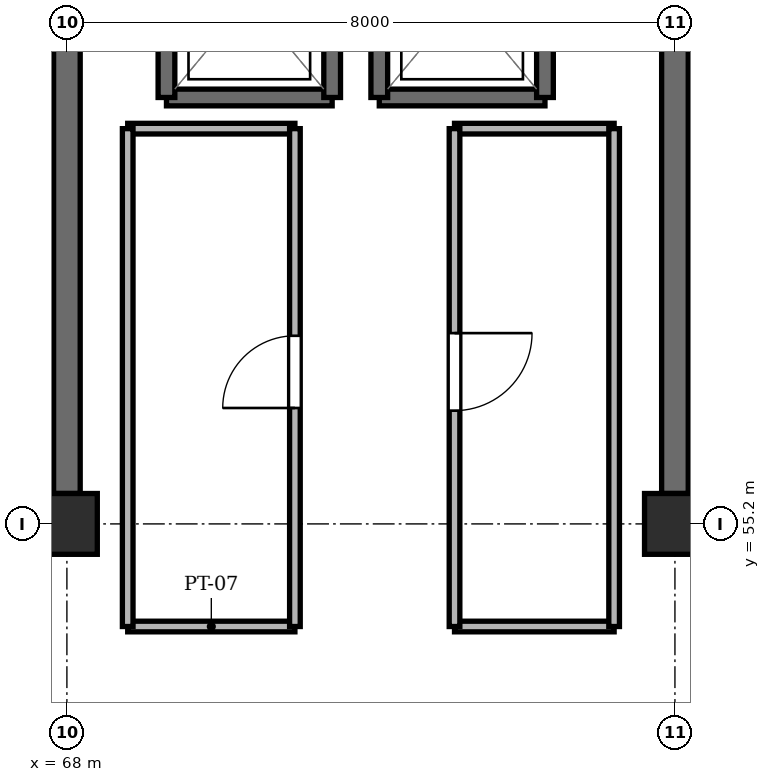
"""IFC4 building model, lengths in metres.
Left out: names, types, materials, properties, quantities, classifications, styles, units other than length and angle.
Written with IfcOpenShell. Run it as: python <this file> out.ifc"""

import sys

from ifc_helpers import new_model, si_unit, direction, frame, frame_2d, origin, origin_2d, place, context, subcontext, project, spatial, rectangle, extrude, element, fill, save


model = new_model("IFC4")
c1 = context("Model", 3, precision=1e-05, world=origin(), true_north=direction((0.0, 1.0)))
c2 = subcontext(c1, "Body", "Model", "MODEL_VIEW")
j1 = project(units=[si_unit("LENGTHUNIT", "METRE"), si_unit("PLANEANGLEUNIT", "RADIAN")], contexts=[c1])
p1 = place(None, origin())
s1 = spatial("IfcSite", under=j1, at=p1, CompositionType="ELEMENT")
p2 = place(p1, origin())
s2 = spatial("IfcBuilding", under=s1, at=p2, CompositionType="ELEMENT")
p3 = place(p2, frame((0.0, 0.0, 56.8)))
s3 = spatial("IfcBuildingStorey", under=s2, at=p3, CompositionType="ELEMENT", Elevation=56.8)
for number, where, z_axis, x_axis in (
    (1, (68.0, 55.2, -0.22), (0.0, 0.0, 1.0), (1.0, 0.0, 0.0)),
    (2, (76.0, 55.2, -0.22), (0.0, 0.0, 1.0), (1.0, 0.0, 0.0)),
):
    element("IfcColumn", number, at=place(p3, frame(where, z_axis=z_axis, x_axis=x_axis)), inside=s3, PredefinedType="COLUMN", context=c2, shape_type="SweptSolid", body=[
        extrude(rectangle(XDim=0.8, YDim=0.8, at=origin_2d()), origin(), (0.0, 0.0, 1.0), 3.26),
    ])
for number, where, z_axis, x_axis in (
    (3, (68.0, 55.6, 0.0), (0.0, 0.0, 1.0), (0.0, 1.0, 0.0)),
    (4, (76.0, 55.6, 0.0), (0.0, 0.0, 1.0), (0.0, 1.0, 0.0)),
):
    element("IfcWall", number, at=place(p3, frame(where, z_axis=z_axis, x_axis=x_axis)), inside=s3, PredefinedType="SHEAR", context=c2, shape_type="SweptSolid", body=[
        extrude(rectangle(XDim=6.45, YDim=0.35, at=frame_2d((3.225, 0.0))), origin(), (0.0, 0.0, 1.0), 3.04),
    ])
p4 = place(p3, frame((69.31, 60.81, 0.0), z_axis=(0.0, 0.0, 1.0), x_axis=(1.0, 0.0, 0.0)))
e5 = element("IfcWall", 5, at=p4, inside=s3, PredefinedType="SHEAR", context=c2, shape_type="SweptSolid", body=[
    extrude(rectangle(XDim=2.18, YDim=0.22, at=frame_2d((1.09, 0.0))), origin(), (0.0, 0.0, 1.0), 3.04),
])
for number, where, z_axis, x_axis in (
    (6, (69.31, 63.39, 0.0), (0.0, 0.0, 1.0), (0.0, -1.0, 0.0)),
    (7, (71.49, 60.81, 0.0), (0.0, 0.0, 1.0), (0.0, 1.0, 0.0)),
):
    element("IfcWall", number, at=place(p3, frame(where, z_axis=z_axis, x_axis=x_axis)), inside=s3, PredefinedType="SHEAR", context=c2, shape_type="SweptSolid", body=[
        extrude(rectangle(XDim=2.58, YDim=0.22, at=frame_2d((1.29, 0.0))), origin(), (0.0, 0.0, 1.0), 3.04),
    ])
p5 = place(p3, frame((72.11, 60.81, 0.0), z_axis=(0.0, 0.0, 1.0), x_axis=(1.0, 0.0, 0.0)))
e8 = element("IfcWall", 8, at=p5, inside=s3, PredefinedType="SHEAR", context=c2, shape_type="SweptSolid", body=[
    extrude(rectangle(XDim=2.18, YDim=0.22, at=frame_2d((1.09, 0.0))), origin(), (0.0, 0.0, 1.0), 3.04),
])
for number, where, z_axis, x_axis in (
    (9, (72.11, 63.39, 0.0), (0.0, 0.0, 1.0), (0.0, -1.0, 0.0)),
    (10, (74.29, 60.81, 0.0), (0.0, 0.0, 1.0), (0.0, 1.0, 0.0)),
):
    element("IfcWall", number, at=place(p3, frame(where, z_axis=z_axis, x_axis=x_axis)), inside=s3, PredefinedType="SHEAR", context=c2, shape_type="SweptSolid", body=[
        extrude(rectangle(XDim=2.58, YDim=0.22, at=frame_2d((1.29, 0.0))), origin(), (0.0, 0.0, 1.0), 3.04),
    ])
for number, where, z_axis, x_axis in (
    (11, (68.8, 53.85, 0.0), (0.0, 0.0, 1.0), (1.0, 0.0, 0.0)),
    (12, (68.8, 60.4, 0.0), (0.0, 0.0, 1.0), (1.0, 0.0, 0.0)),
):
    element("IfcWall", number, at=place(p3, frame(where, z_axis=z_axis, x_axis=x_axis)), inside=s3, PredefinedType="PARTITIONING", context=c2, shape_type="SweptSolid", body=[
        extrude(rectangle(XDim=2.2, YDim=0.14, at=frame_2d((1.1, 0.0))), origin(), (0.0, 0.0, 1.0), 2.53),
    ])
p6 = place(p3, frame((68.8, 53.85, 0.0), z_axis=(0.0, 0.0, 1.0), x_axis=(0.0, 1.0, 0.0)))
e13 = element("IfcWall", 13, at=p6, inside=s3, PredefinedType="PARTITIONING", context=c2, shape_type="SweptSolid", body=[
    extrude(rectangle(XDim=6.55, YDim=0.14, at=frame_2d((3.275, 0.0))), origin(), (0.0, 0.0, 1.0), 2.53),
])
p7 = place(p3, frame((71.0, 53.85, 0.0), z_axis=(0.0, 0.0, 1.0), x_axis=(0.0, 1.0, 0.0)))
e14 = element("IfcWall", 14, at=p7, inside=s3, PredefinedType="PARTITIONING", context=c2, shape_type="SweptSolid", body=[
    extrude(rectangle(XDim=6.55, YDim=0.14, at=frame_2d((3.275, 0.0))), origin(), (0.0, 0.0, 1.0), 2.53),
])
p8 = place(p7, frame((2.875, 0.0, 0.0)))
e15 = element("IfcOpeningElement", 15, at=p8, cuts=e14, PredefinedType="OPENING", context=c2, shape_type="SweptSolid", body=[
    extrude(rectangle(XDim=0.95, YDim=2.1, at=frame_2d((0.475, 1.05))), frame((0.0, 0.082, 0.0), z_axis=(0.0, -1.0, 0.0), x_axis=(1.0, 0.0, 0.0)), (0.0, 0.0, 1.0), 0.164),
])
for number, where, z_axis, x_axis in (
    (16, (73.1, 53.85, 0.0), (0.0, 0.0, 1.0), (1.0, 0.0, 0.0)),
    (17, (73.1, 60.4, 0.0), (0.0, 0.0, 1.0), (1.0, 0.0, 0.0)),
):
    element("IfcWall", number, at=place(p3, frame(where, z_axis=z_axis, x_axis=x_axis)), inside=s3, PredefinedType="PARTITIONING", context=c2, shape_type="SweptSolid", body=[
        extrude(rectangle(XDim=2.1, YDim=0.14, at=frame_2d((1.05, 0.0))), origin(), (0.0, 0.0, 1.0), 2.53),
    ])
p9 = place(p3, frame((73.1, 53.85, 0.0), z_axis=(0.0, 0.0, 1.0), x_axis=(0.0, 1.0, 0.0)))
e18 = element("IfcWall", 18, at=p9, inside=s3, PredefinedType="PARTITIONING", context=c2, shape_type="SweptSolid", body=[
    extrude(rectangle(XDim=6.55, YDim=0.14, at=frame_2d((3.275, 0.0))), origin(), (0.0, 0.0, 1.0), 2.53),
])
p10 = place(p9, frame((2.84, 0.0, 0.0)))
e19 = element("IfcOpeningElement", 19, at=p10, cuts=e18, PredefinedType="OPENING", context=c2, shape_type="SweptSolid", body=[
    extrude(rectangle(XDim=1.02, YDim=2.1, at=frame_2d((0.51, 1.05))), frame((0.0, 0.082, 0.0), z_axis=(0.0, -1.0, 0.0), x_axis=(1.0, 0.0, 0.0)), (0.0, 0.0, 1.0), 0.164),
])
p11 = place(p3, frame((75.2, 53.85, 0.0), z_axis=(0.0, 0.0, 1.0), x_axis=(0.0, 1.0, 0.0)))
e20 = element("IfcWall", 20, at=p11, inside=s3, PredefinedType="PARTITIONING", context=c2, shape_type="SweptSolid", body=[
    extrude(rectangle(XDim=6.55, YDim=0.14, at=frame_2d((3.275, 0.0))), origin(), (0.0, 0.0, 1.0), 2.53),
])
p12 = place(p8, origin())
e21 = element("IfcDoor", 21, at=p12, inside=s3, OperationType="SINGLE_SWING_LEFT", PredefinedType="DOOR", context=c2, shape_type="SweptSolid", body=[
    extrude(rectangle(XDim=0.95, YDim=2.1, at=frame_2d((0.475, 1.05))), frame((0.0, 0.025, 0.0), z_axis=(0.0, -1.0, 0.0), x_axis=(1.0, 0.0, 0.0)), (0.0, 0.0, 1.0), 0.05),
])
fill(e15, e21)
p13 = place(p10, frame((1.02, 0.0, 0.0), z_axis=(0.0, 0.0, 1.0), x_axis=(-1.0, 0.0, 0.0)))
e22 = element("IfcDoor", 22, at=p13, inside=s3, OperationType="SINGLE_SWING_RIGHT", PredefinedType="DOOR", context=c2, shape_type="SweptSolid", body=[
    extrude(rectangle(XDim=1.02, YDim=2.1, at=frame_2d((0.51, 1.05))), frame((0.0, 0.025, 0.0), z_axis=(0.0, -1.0, 0.0), x_axis=(1.0, 0.0, 0.0)), (0.0, 0.0, 1.0), 0.05),
])
fill(e19, e22)
save(model, sys.argv[1])
